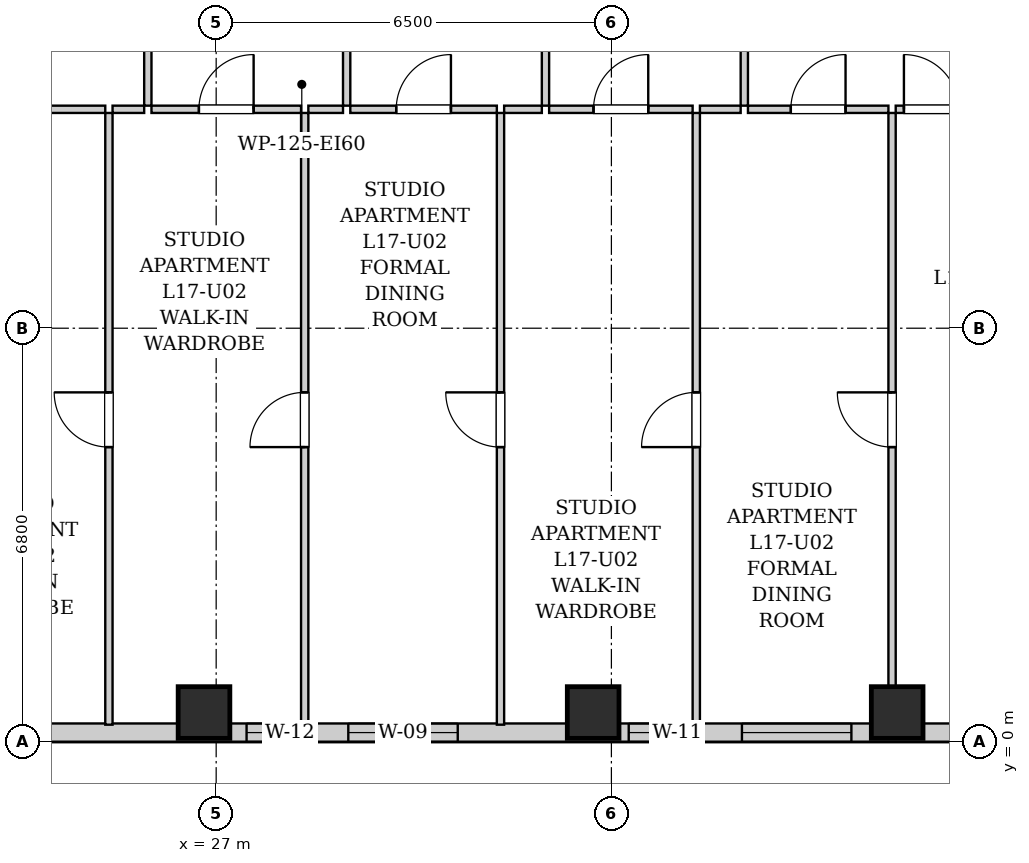
"""IFC4 building model, lengths in metres.
Left out: names, types, materials, properties, quantities, classifications, styles, units other than length and angle.
Written with IfcOpenShell. Run it as: python <this file> out.ifc"""

import sys

from ifc_helpers import new_model, si_unit, direction, frame, frame_2d, origin, origin_2d, place, context, subcontext, project, spatial, rectangle, extrude, element, fill, save


model = new_model("IFC4")
c1 = context("Model", 3, precision=1e-05, world=origin(), true_north=direction((0.0, 1.0)))
c2 = subcontext(c1, "Body", "Model", "MODEL_VIEW")
j1 = project(units=[si_unit("LENGTHUNIT", "METRE"), si_unit("PLANEANGLEUNIT", "RADIAN")], contexts=[c1])
p1 = place(None, origin())
s1 = spatial("IfcSite", under=j1, at=p1, CompositionType="ELEMENT")
p2 = place(p1, origin())
s2 = spatial("IfcBuilding", under=s1, at=p2, CompositionType="ELEMENT")
p3 = place(p2, frame((0.0, 0.0, 64.2)))
s3 = spatial("IfcBuildingStorey", under=s2, at=p3, CompositionType="ELEMENT", Elevation=64.2)
for number, where, z_axis, x_axis in (
    (1, (26.8, 0.48, 0.0), (0.0, 0.0, 1.0), (1.0, 0.0, 0.0)),
    (2, (33.2, 0.48, 0.0), (0.0, 0.0, 1.0), (1.0, 0.0, 0.0)),
    (3, (38.2, 0.48, 0.0), (0.0, 0.0, 1.0), (1.0, 0.0, 0.0)),
):
    element("IfcColumn", number, at=place(p3, frame(where, z_axis=z_axis, x_axis=x_axis)), inside=s3, PredefinedType="COLUMN", context=c2, shape_type="SweptSolid", body=[
        extrude(rectangle(XDim=0.85, YDim=0.85, at=origin_2d()), origin(), (0.0, 0.0, 1.0), 3.2),
    ])
p4 = place(p3, frame((44.0, 0.15, 0.0), z_axis=(0.0, 0.0, 1.0), x_axis=(-1.0, 0.0, 0.0)))
e4 = element("IfcWall", 4, at=p4, inside=s3, PredefinedType="SOLIDWALL", context=c2, shape_type="SweptSolid", body=[
    extrude(rectangle(XDim=26.35, YDim=0.3, at=frame_2d((13.175, 0.0))), origin(), (0.0, 0.0, 1.0), 1.975),
])
p5 = place(p4, frame((22.665, 0.0, 0.55)))
e5 = element("IfcOpeningElement", 5, at=p5, cuts=e4, PredefinedType="OPENING", context=c2, shape_type="SweptSolid", body=[
    extrude(rectangle(XDim=1.8, YDim=1.2, at=frame_2d((0.9, 0.6))), frame((0.0, 0.16, 0.0), z_axis=(0.0, -1.0, 0.0), x_axis=(1.0, 0.0, 0.0)), (0.0, 0.0, 1.0), 0.32),
])
p6 = place(p4, frame((15.82, 0.0, 0.55)))
e6 = element("IfcOpeningElement", 6, at=p6, cuts=e4, PredefinedType="OPENING", context=c2, shape_type="SweptSolid", body=[
    extrude(rectangle(XDim=0.68, YDim=1.2, at=frame_2d((0.34, 0.6))), frame((0.0, 0.16, 0.0), z_axis=(0.0, -1.0, 0.0), x_axis=(1.0, 0.0, 0.0)), (0.0, 0.0, 1.0), 0.32),
])
p7 = place(p4, frame((13.027, 0.0, 0.55)))
e7 = element("IfcOpeningElement", 7, at=p7, cuts=e4, PredefinedType="OPENING", context=c2, shape_type="SweptSolid", body=[
    extrude(rectangle(XDim=1.8, YDim=1.2, at=frame_2d((0.9, 0.6))), frame((0.0, 0.16, 0.0), z_axis=(0.0, -1.0, 0.0), x_axis=(1.0, 0.0, 0.0)), (0.0, 0.0, 1.0), 0.32),
])
p8 = place(p4, frame((9.365, 0.0, 0.55)))
e8 = element("IfcOpeningElement", 8, at=p8, cuts=e4, PredefinedType="OPENING", context=c2, shape_type="SweptSolid", body=[
    extrude(rectangle(XDim=0.85, YDim=1.2, at=frame_2d((0.425, 0.6))), frame((0.0, 0.16, 0.0), z_axis=(0.0, -1.0, 0.0), x_axis=(1.0, 0.0, 0.0)), (0.0, 0.0, 1.0), 0.32),
])
p9 = place(p4, frame((6.553, 0.0, 0.55)))
e9 = element("IfcOpeningElement", 9, at=p9, cuts=e4, PredefinedType="OPENING", context=c2, shape_type="SweptSolid", body=[
    extrude(rectangle(XDim=1.8, YDim=1.2, at=frame_2d((0.9, 0.6))), frame((0.0, 0.16, 0.0), z_axis=(0.0, -1.0, 0.0), x_axis=(1.0, 0.0, 0.0)), (0.0, 0.0, 1.0), 0.32),
])
p10 = place(p4, frame((2.262, 0.0, 0.55)))
e10 = element("IfcOpeningElement", 10, at=p10, cuts=e4, PredefinedType="OPENING", context=c2, shape_type="SweptSolid", body=[
    extrude(rectangle(XDim=1.8, YDim=1.2, at=frame_2d((0.9, 0.6))), frame((0.0, 0.16, 0.0), z_axis=(0.0, -1.0, 0.0), x_axis=(1.0, 0.0, 0.0)), (0.0, 0.0, 1.0), 0.32),
])
p11 = place(p3, frame((25.876, 10.46, 0.0), z_axis=(0.0, 0.0, 1.0), x_axis=(0.0, 1.0, 0.0)))
e11 = element("IfcWall", 11, at=p11, inside=s3, PredefinedType="PARTITIONING", context=c2, shape_type="SweptSolid", body=[
    extrude(rectangle(XDim=2.85, YDim=0.12, at=frame_2d((1.425, 0.0))), origin(), (0.0, 0.0, 1.0), 2.94),
])
p12 = place(p11, frame((0.975, 0.0, 0.0)))
e12 = element("IfcOpeningElement", 12, at=p12, cuts=e11, PredefinedType="OPENING", context=c2, shape_type="SweptSolid", body=[
    extrude(rectangle(XDim=0.9, YDim=2.05, at=frame_2d((0.45, 1.025))), frame((0.0, 0.07, 0.0), z_axis=(0.0, -1.0, 0.0), x_axis=(1.0, 0.0, 0.0)), (0.0, 0.0, 1.0), 0.14),
])
p13 = place(p3, frame((22.076, 10.4, 0.0), z_axis=(0.0, 0.0, 1.0), x_axis=(1.0, 0.0, 0.0)))
e13 = element("IfcWall", 13, at=p13, inside=s3, PredefinedType="PARTITIONING", context=c2, shape_type="SweptSolid", body=[
    extrude(rectangle(XDim=3.1, YDim=0.12, at=frame_2d((1.55, 0.0))), origin(), (0.0, 0.0, 1.0), 2.94),
])
p14 = place(p13, frame((1.1, 0.0, 0.0)))
e14 = element("IfcOpeningElement", 14, at=p14, cuts=e13, PredefinedType="OPENING", context=c2, shape_type="SweptSolid", body=[
    extrude(rectangle(XDim=0.9, YDim=2.05, at=frame_2d((0.45, 1.025))), frame((0.0, 0.07, 0.0), z_axis=(0.0, -1.0, 0.0), x_axis=(1.0, 0.0, 0.0)), (0.0, 0.0, 1.0), 0.14),
])
p15 = place(p3, frame((25.296, 10.4, 0.0), z_axis=(0.0, 0.0, 1.0), x_axis=(1.0, 0.0, 0.0)))
e15 = element("IfcWall", 15, at=p15, inside=s3, PredefinedType="PARTITIONING", context=c2, shape_type="SweptSolid", body=[
    extrude(rectangle(XDim=0.52, YDim=0.12, at=frame_2d((0.26, 0.0))), origin(), (0.0, 0.0, 1.0), 2.94),
])
p16 = place(p3, frame((29.146, 10.46, 0.0), z_axis=(0.0, 0.0, 1.0), x_axis=(0.0, 1.0, 0.0)))
e16 = element("IfcWall", 16, at=p16, inside=s3, PredefinedType="PARTITIONING", context=c2, shape_type="SweptSolid", body=[
    extrude(rectangle(XDim=2.85, YDim=0.12, at=frame_2d((1.425, 0.0))), origin(), (0.0, 0.0, 1.0), 2.94),
])
p17 = place(p16, frame((0.975, 0.0, 0.0)))
e17 = element("IfcOpeningElement", 17, at=p17, cuts=e16, PredefinedType="OPENING", context=c2, shape_type="SweptSolid", body=[
    extrude(rectangle(XDim=0.9, YDim=2.05, at=frame_2d((0.45, 1.025))), frame((0.0, 0.07, 0.0), z_axis=(0.0, -1.0, 0.0), x_axis=(1.0, 0.0, 0.0)), (0.0, 0.0, 1.0), 0.14),
])
p18 = place(p3, frame((25.936, 10.4, 0.0), z_axis=(0.0, 0.0, 1.0), x_axis=(1.0, 0.0, 0.0)))
e18 = element("IfcWall", 18, at=p18, inside=s3, PredefinedType="PARTITIONING", context=c2, shape_type="SweptSolid", body=[
    extrude(rectangle(XDim=2.46, YDim=0.12, at=frame_2d((1.23, 0.0))), origin(), (0.0, 0.0, 1.0), 2.94),
])
p19 = place(p18, frame((0.78, 0.0, 0.0)))
e19 = element("IfcOpeningElement", 19, at=p19, cuts=e18, PredefinedType="OPENING", context=c2, shape_type="SweptSolid", body=[
    extrude(rectangle(XDim=0.9, YDim=2.05, at=frame_2d((0.45, 1.025))), frame((0.0, 0.07, 0.0), z_axis=(0.0, -1.0, 0.0), x_axis=(1.0, 0.0, 0.0)), (0.0, 0.0, 1.0), 0.14),
])
p20 = place(p3, frame((28.516, 10.4, 0.0), z_axis=(0.0, 0.0, 1.0), x_axis=(1.0, 0.0, 0.0)))
e20 = element("IfcWall", 20, at=p20, inside=s3, PredefinedType="PARTITIONING", context=c2, shape_type="SweptSolid", body=[
    extrude(rectangle(XDim=0.57, YDim=0.12, at=frame_2d((0.285, 0.0))), origin(), (0.0, 0.0, 1.0), 2.94),
])
p21 = place(p3, frame((32.416, 10.46, 0.0), z_axis=(0.0, 0.0, 1.0), x_axis=(0.0, 1.0, 0.0)))
e21 = element("IfcWall", 21, at=p21, inside=s3, PredefinedType="PARTITIONING", context=c2, shape_type="SweptSolid", body=[
    extrude(rectangle(XDim=2.85, YDim=0.12, at=frame_2d((1.425, 0.0))), origin(), (0.0, 0.0, 1.0), 2.94),
])
p22 = place(p21, frame((0.975, 0.0, 0.0)))
e22 = element("IfcOpeningElement", 22, at=p22, cuts=e21, PredefinedType="OPENING", context=c2, shape_type="SweptSolid", body=[
    extrude(rectangle(XDim=0.9, YDim=2.05, at=frame_2d((0.45, 1.025))), frame((0.0, 0.07, 0.0), z_axis=(0.0, -1.0, 0.0), x_axis=(1.0, 0.0, 0.0)), (0.0, 0.0, 1.0), 0.14),
])
p23 = place(p3, frame((29.206, 10.4, 0.0), z_axis=(0.0, 0.0, 1.0), x_axis=(1.0, 0.0, 0.0)))
e23 = element("IfcWall", 23, at=p23, inside=s3, PredefinedType="PARTITIONING", context=c2, shape_type="SweptSolid", body=[
    extrude(rectangle(XDim=2.41, YDim=0.12, at=frame_2d((1.205, 0.0))), origin(), (0.0, 0.0, 1.0), 2.94),
])
p24 = place(p23, frame((0.755, 0.0, 0.0)))
e24 = element("IfcOpeningElement", 24, at=p24, cuts=e23, PredefinedType="OPENING", context=c2, shape_type="SweptSolid", body=[
    extrude(rectangle(XDim=0.9, YDim=2.05, at=frame_2d((0.45, 1.025))), frame((0.0, 0.07, 0.0), z_axis=(0.0, -1.0, 0.0), x_axis=(1.0, 0.0, 0.0)), (0.0, 0.0, 1.0), 0.14),
])
p25 = place(p3, frame((31.736, 10.4, 0.0), z_axis=(0.0, 0.0, 1.0), x_axis=(1.0, 0.0, 0.0)))
e25 = element("IfcWall", 25, at=p25, inside=s3, PredefinedType="PARTITIONING", context=c2, shape_type="SweptSolid", body=[
    extrude(rectangle(XDim=0.62, YDim=0.12, at=frame_2d((0.31, 0.0))), origin(), (0.0, 0.0, 1.0), 2.94),
])
p26 = place(p3, frame((35.686, 10.46, 0.0), z_axis=(0.0, 0.0, 1.0), x_axis=(0.0, 1.0, 0.0)))
e26 = element("IfcWall", 26, at=p26, inside=s3, PredefinedType="PARTITIONING", context=c2, shape_type="SweptSolid", body=[
    extrude(rectangle(XDim=2.85, YDim=0.12, at=frame_2d((1.425, 0.0))), origin(), (0.0, 0.0, 1.0), 2.94),
])
p27 = place(p26, frame((0.975, 0.0, 0.0)))
e27 = element("IfcOpeningElement", 27, at=p27, cuts=e26, PredefinedType="OPENING", context=c2, shape_type="SweptSolid", body=[
    extrude(rectangle(XDim=0.9, YDim=2.05, at=frame_2d((0.45, 1.025))), frame((0.0, 0.07, 0.0), z_axis=(0.0, -1.0, 0.0), x_axis=(1.0, 0.0, 0.0)), (0.0, 0.0, 1.0), 0.14),
])
p28 = place(p3, frame((32.476, 10.4, 0.0), z_axis=(0.0, 0.0, 1.0), x_axis=(1.0, 0.0, 0.0)))
e28 = element("IfcWall", 28, at=p28, inside=s3, PredefinedType="PARTITIONING", context=c2, shape_type="SweptSolid", body=[
    extrude(rectangle(XDim=2.36, YDim=0.12, at=frame_2d((1.18, 0.0))), origin(), (0.0, 0.0, 1.0), 2.94),
])
p29 = place(p28, frame((0.73, 0.0, 0.0)))
e29 = element("IfcOpeningElement", 29, at=p29, cuts=e28, PredefinedType="OPENING", context=c2, shape_type="SweptSolid", body=[
    extrude(rectangle(XDim=0.9, YDim=2.05, at=frame_2d((0.45, 1.025))), frame((0.0, 0.07, 0.0), z_axis=(0.0, -1.0, 0.0), x_axis=(1.0, 0.0, 0.0)), (0.0, 0.0, 1.0), 0.14),
])
p30 = place(p3, frame((34.956, 10.4, 0.0), z_axis=(0.0, 0.0, 1.0), x_axis=(1.0, 0.0, 0.0)))
e30 = element("IfcWall", 30, at=p30, inside=s3, PredefinedType="PARTITIONING", context=c2, shape_type="SweptSolid", body=[
    extrude(rectangle(XDim=0.67, YDim=0.12, at=frame_2d((0.335, 0.0))), origin(), (0.0, 0.0, 1.0), 2.94),
])
p31 = place(p3, frame((35.746, 10.4, 0.0), z_axis=(0.0, 0.0, 1.0), x_axis=(1.0, 0.0, 0.0)))
e31 = element("IfcWall", 31, at=p31, inside=s3, PredefinedType="PARTITIONING", context=c2, shape_type="SweptSolid", body=[
    extrude(rectangle(XDim=2.31, YDim=0.12, at=frame_2d((1.155, 0.0))), origin(), (0.0, 0.0, 1.0), 2.94),
])
p32 = place(p31, frame((0.705, 0.0, 0.0)))
e32 = element("IfcOpeningElement", 32, at=p32, cuts=e31, PredefinedType="OPENING", context=c2, shape_type="SweptSolid", body=[
    extrude(rectangle(XDim=0.9, YDim=2.05, at=frame_2d((0.45, 1.025))), frame((0.0, 0.07, 0.0), z_axis=(0.0, -1.0, 0.0), x_axis=(1.0, 0.0, 0.0)), (0.0, 0.0, 1.0), 0.14),
])
p33 = place(p3, frame((38.176, 10.4, 0.0), z_axis=(0.0, 0.0, 1.0), x_axis=(1.0, 0.0, 0.0)))
e33 = element("IfcWall", 33, at=p33, inside=s3, PredefinedType="PARTITIONING", context=c2, shape_type="SweptSolid", body=[
    extrude(rectangle(XDim=1.17, YDim=0.12, at=frame_2d((0.585, 0.0))), origin(), (0.0, 0.0, 1.0), 2.94),
])
p34 = place(p33, frame((0.135, 0.0, 0.0)))
e34 = element("IfcOpeningElement", 34, at=p34, cuts=e33, PredefinedType="OPENING", context=c2, shape_type="SweptSolid", body=[
    extrude(rectangle(XDim=0.9, YDim=2.05, at=frame_2d((0.45, 1.025))), frame((0.0, 0.07, 0.0), z_axis=(0.0, -1.0, 0.0), x_axis=(1.0, 0.0, 0.0)), (0.0, 0.0, 1.0), 0.14),
])
p35 = place(p3, frame((25.236, 0.28, 0.0), z_axis=(0.0, 0.0, 1.0), x_axis=(0.0, 1.0, 0.0)))
e35 = element("IfcWall", 35, at=p35, inside=s3, PredefinedType="PARTITIONING", context=c2, shape_type="SweptSolid", body=[
    extrude(rectangle(XDim=10.06, YDim=0.12, at=frame_2d((5.03, 0.0))), origin(), (0.0, 0.0, 1.0), 2.94),
])
p36 = place(p35, frame((4.565, 0.0, 0.0)))
e36 = element("IfcOpeningElement", 36, at=p36, cuts=e35, PredefinedType="OPENING", context=c2, shape_type="SweptSolid", body=[
    extrude(rectangle(XDim=0.9, YDim=2.05, at=frame_2d((0.45, 1.025))), frame((0.0, 0.07, 0.0), z_axis=(0.0, -1.0, 0.0), x_axis=(1.0, 0.0, 0.0)), (0.0, 0.0, 1.0), 0.14),
])
p37 = place(p3, frame((28.456, 0.28, 0.0), z_axis=(0.0, 0.0, 1.0), x_axis=(0.0, 1.0, 0.0)))
e37 = element("IfcWall", 37, at=p37, inside=s3, PredefinedType="PARTITIONING", context=c2, shape_type="SweptSolid", body=[
    extrude(rectangle(XDim=10.06, YDim=0.12, at=frame_2d((5.03, 0.0))), origin(), (0.0, 0.0, 1.0), 2.94),
])
p38 = place(p37, frame((4.565, 0.0, 0.0)))
e38 = element("IfcOpeningElement", 38, at=p38, cuts=e37, PredefinedType="OPENING", context=c2, shape_type="SweptSolid", body=[
    extrude(rectangle(XDim=0.9, YDim=2.05, at=frame_2d((0.45, 1.025))), frame((0.0, 0.07, 0.0), z_axis=(0.0, -1.0, 0.0), x_axis=(1.0, 0.0, 0.0)), (0.0, 0.0, 1.0), 0.14),
])
p39 = place(p3, frame((31.676, 0.28, 0.0), z_axis=(0.0, 0.0, 1.0), x_axis=(0.0, 1.0, 0.0)))
e39 = element("IfcWall", 39, at=p39, inside=s3, PredefinedType="PARTITIONING", context=c2, shape_type="SweptSolid", body=[
    extrude(rectangle(XDim=10.06, YDim=0.12, at=frame_2d((5.03, 0.0))), origin(), (0.0, 0.0, 1.0), 2.94),
])
p40 = place(p39, frame((4.565, 0.0, 0.0)))
e40 = element("IfcOpeningElement", 40, at=p40, cuts=e39, PredefinedType="OPENING", context=c2, shape_type="SweptSolid", body=[
    extrude(rectangle(XDim=0.9, YDim=2.05, at=frame_2d((0.45, 1.025))), frame((0.0, 0.07, 0.0), z_axis=(0.0, -1.0, 0.0), x_axis=(1.0, 0.0, 0.0)), (0.0, 0.0, 1.0), 0.14),
])
p41 = place(p3, frame((34.896, 0.28, 0.0), z_axis=(0.0, 0.0, 1.0), x_axis=(0.0, 1.0, 0.0)))
e41 = element("IfcWall", 41, at=p41, inside=s3, PredefinedType="PARTITIONING", context=c2, shape_type="SweptSolid", body=[
    extrude(rectangle(XDim=10.06, YDim=0.12, at=frame_2d((5.03, 0.0))), origin(), (0.0, 0.0, 1.0), 2.94),
])
p42 = place(p41, frame((4.565, 0.0, 0.0)))
e42 = element("IfcOpeningElement", 42, at=p42, cuts=e41, PredefinedType="OPENING", context=c2, shape_type="SweptSolid", body=[
    extrude(rectangle(XDim=0.9, YDim=2.05, at=frame_2d((0.45, 1.025))), frame((0.0, 0.07, 0.0), z_axis=(0.0, -1.0, 0.0), x_axis=(1.0, 0.0, 0.0)), (0.0, 0.0, 1.0), 0.14),
])
p43 = place(p3, frame((38.116, 0.28, 0.0), z_axis=(0.0, 0.0, 1.0), x_axis=(0.0, 1.0, 0.0)))
e43 = element("IfcWall", 43, at=p43, inside=s3, PredefinedType="PARTITIONING", context=c2, shape_type="SweptSolid", body=[
    extrude(rectangle(XDim=10.06, YDim=0.12, at=frame_2d((5.03, 0.0))), origin(), (0.0, 0.0, 1.0), 2.94),
])
p44 = place(p43, frame((4.565, 0.0, 0.0)))
e44 = element("IfcOpeningElement", 44, at=p44, cuts=e43, PredefinedType="OPENING", context=c2, shape_type="SweptSolid", body=[
    extrude(rectangle(XDim=0.9, YDim=2.05, at=frame_2d((0.45, 1.025))), frame((0.0, 0.07, 0.0), z_axis=(0.0, -1.0, 0.0), x_axis=(1.0, 0.0, 0.0)), (0.0, 0.0, 1.0), 0.14),
])
p45 = place(p19, origin())
e45 = element("IfcDoor", 45, at=p45, inside=s3, OperationType="SINGLE_SWING_RIGHT", PredefinedType="DOOR", context=c2, shape_type="SweptSolid", body=[
    extrude(rectangle(XDim=0.9, YDim=2.05, at=frame_2d((0.45, 1.025))), frame((0.0, 0.025, 0.0), z_axis=(0.0, -1.0, 0.0), x_axis=(1.0, 0.0, 0.0)), (0.0, 0.0, 1.0), 0.05),
])
fill(e19, e45)
p46 = place(p24, origin())
e46 = element("IfcDoor", 46, at=p46, inside=s3, OperationType="SINGLE_SWING_RIGHT", PredefinedType="DOOR", context=c2, shape_type="SweptSolid", body=[
    extrude(rectangle(XDim=0.9, YDim=2.05, at=frame_2d((0.45, 1.025))), frame((0.0, 0.025, 0.0), z_axis=(0.0, -1.0, 0.0), x_axis=(1.0, 0.0, 0.0)), (0.0, 0.0, 1.0), 0.05),
])
fill(e24, e46)
p47 = place(p29, origin())
e47 = element("IfcDoor", 47, at=p47, inside=s3, OperationType="SINGLE_SWING_RIGHT", PredefinedType="DOOR", context=c2, shape_type="SweptSolid", body=[
    extrude(rectangle(XDim=0.9, YDim=2.05, at=frame_2d((0.45, 1.025))), frame((0.0, 0.025, 0.0), z_axis=(0.0, -1.0, 0.0), x_axis=(1.0, 0.0, 0.0)), (0.0, 0.0, 1.0), 0.05),
])
fill(e29, e47)
p48 = place(p32, origin())
e48 = element("IfcDoor", 48, at=p48, inside=s3, OperationType="SINGLE_SWING_RIGHT", PredefinedType="DOOR", context=c2, shape_type="SweptSolid", body=[
    extrude(rectangle(XDim=0.9, YDim=2.05, at=frame_2d((0.45, 1.025))), frame((0.0, 0.025, 0.0), z_axis=(0.0, -1.0, 0.0), x_axis=(1.0, 0.0, 0.0)), (0.0, 0.0, 1.0), 0.05),
])
fill(e32, e48)
p49 = place(p34, origin())
e49 = element("IfcDoor", 49, at=p49, inside=s3, OperationType="SINGLE_SWING_LEFT", PredefinedType="DOOR", context=c2, shape_type="SweptSolid", body=[
    extrude(rectangle(XDim=0.9, YDim=2.05, at=frame_2d((0.45, 1.025))), frame((0.0, 0.025, 0.0), z_axis=(0.0, -1.0, 0.0), x_axis=(1.0, 0.0, 0.0)), (0.0, 0.0, 1.0), 0.05),
])
fill(e34, e49)
p50 = place(p36, origin())
e50 = element("IfcDoor", 50, at=p50, inside=s3, OperationType="SINGLE_SWING_RIGHT", PredefinedType="DOOR", context=c2, shape_type="SweptSolid", body=[
    extrude(rectangle(XDim=0.9, YDim=2.05, at=frame_2d((0.45, 1.025))), frame((0.0, 0.025, 0.0), z_axis=(0.0, -1.0, 0.0), x_axis=(1.0, 0.0, 0.0)), (0.0, 0.0, 1.0), 0.05),
])
fill(e36, e50)
p51 = place(p38, origin())
e51 = element("IfcDoor", 51, at=p51, inside=s3, OperationType="SINGLE_SWING_LEFT", PredefinedType="DOOR", context=c2, shape_type="SweptSolid", body=[
    extrude(rectangle(XDim=0.9, YDim=2.05, at=frame_2d((0.45, 1.025))), frame((0.0, 0.025, 0.0), z_axis=(0.0, -1.0, 0.0), x_axis=(1.0, 0.0, 0.0)), (0.0, 0.0, 1.0), 0.05),
])
fill(e38, e51)
p52 = place(p40, origin())
e52 = element("IfcDoor", 52, at=p52, inside=s3, OperationType="SINGLE_SWING_RIGHT", PredefinedType="DOOR", context=c2, shape_type="SweptSolid", body=[
    extrude(rectangle(XDim=0.9, YDim=2.05, at=frame_2d((0.45, 1.025))), frame((0.0, 0.025, 0.0), z_axis=(0.0, -1.0, 0.0), x_axis=(1.0, 0.0, 0.0)), (0.0, 0.0, 1.0), 0.05),
])
fill(e40, e52)
p53 = place(p42, origin())
e53 = element("IfcDoor", 53, at=p53, inside=s3, OperationType="SINGLE_SWING_LEFT", PredefinedType="DOOR", context=c2, shape_type="SweptSolid", body=[
    extrude(rectangle(XDim=0.9, YDim=2.05, at=frame_2d((0.45, 1.025))), frame((0.0, 0.025, 0.0), z_axis=(0.0, -1.0, 0.0), x_axis=(1.0, 0.0, 0.0)), (0.0, 0.0, 1.0), 0.05),
])
fill(e42, e53)
p54 = place(p44, origin())
e54 = element("IfcDoor", 54, at=p54, inside=s3, OperationType="SINGLE_SWING_RIGHT", PredefinedType="DOOR", context=c2, shape_type="SweptSolid", body=[
    extrude(rectangle(XDim=0.9, YDim=2.05, at=frame_2d((0.45, 1.025))), frame((0.0, 0.025, 0.0), z_axis=(0.0, -1.0, 0.0), x_axis=(1.0, 0.0, 0.0)), (0.0, 0.0, 1.0), 0.05),
])
fill(e44, e54)
p55 = place(p6, origin())
e55 = element("IfcWindow", 55, at=p55, inside=s3, PartitioningType="SINGLE_PANEL", PredefinedType="WINDOW", context=c2, shape_type="SweptSolid", body=[
    extrude(rectangle(XDim=0.68, YDim=1.2, at=frame_2d((0.34, 0.6))), frame((0.0, 0.03, 0.0), z_axis=(0.0, -1.0, 0.0), x_axis=(1.0, 0.0, 0.0)), (0.0, 0.0, 1.0), 0.06),
])
fill(e6, e55)
p56 = place(p7, origin())
e56 = element("IfcWindow", 56, at=p56, inside=s3, PartitioningType="DOUBLE_PANEL_VERTICAL", PredefinedType="WINDOW", context=c2, shape_type="SweptSolid", body=[
    extrude(rectangle(XDim=1.8, YDim=1.2, at=frame_2d((0.9, 0.6))), frame((0.0, 0.03, 0.0), z_axis=(0.0, -1.0, 0.0), x_axis=(1.0, 0.0, 0.0)), (0.0, 0.0, 1.0), 0.06),
])
fill(e7, e56)
p57 = place(p8, origin())
e57 = element("IfcWindow", 57, at=p57, inside=s3, PartitioningType="SINGLE_PANEL", PredefinedType="WINDOW", context=c2, shape_type="SweptSolid", body=[
    extrude(rectangle(XDim=0.85, YDim=1.2, at=frame_2d((0.425, 0.6))), frame((0.0, 0.03, 0.0), z_axis=(0.0, -1.0, 0.0), x_axis=(1.0, 0.0, 0.0)), (0.0, 0.0, 1.0), 0.06),
])
fill(e8, e57)
p58 = place(p9, origin())
e58 = element("IfcWindow", 58, at=p58, inside=s3, PartitioningType="DOUBLE_PANEL_VERTICAL", PredefinedType="WINDOW", context=c2, shape_type="SweptSolid", body=[
    extrude(rectangle(XDim=1.8, YDim=1.2, at=frame_2d((0.9, 0.6))), frame((0.0, 0.03, 0.0), z_axis=(0.0, -1.0, 0.0), x_axis=(1.0, 0.0, 0.0)), (0.0, 0.0, 1.0), 0.06),
])
fill(e9, e58)
save(model, sys.argv[1])
